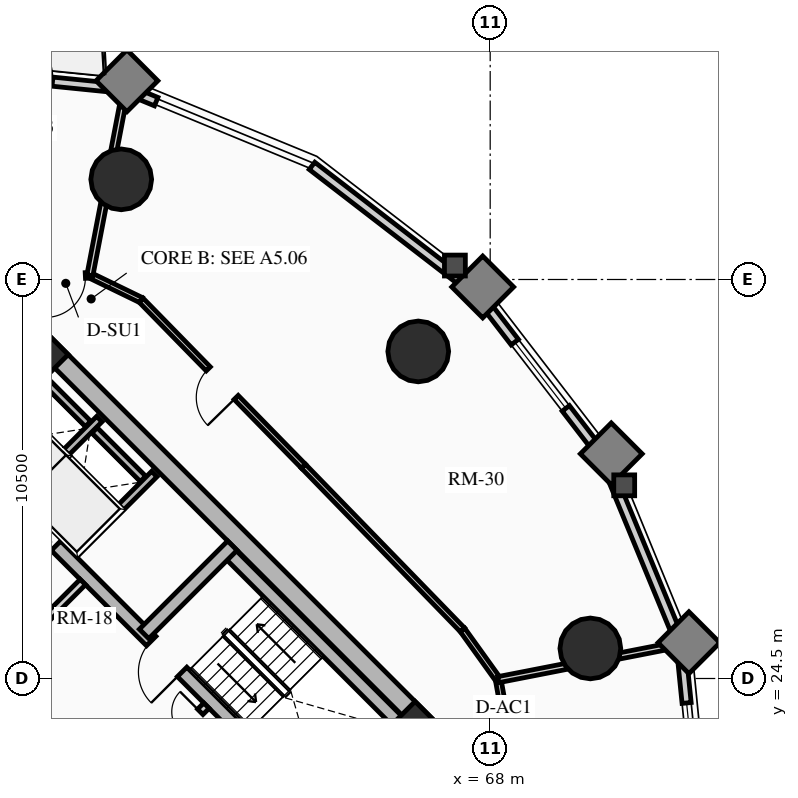
"""IFC4 building model, lengths in metres.
Left out: names, types, materials, properties, quantities, classifications, styles, units other than length and angle.
Written with IfcOpenShell. Run it as: python <this file> out.ifc"""

import sys

from ifc_helpers import new_model, si_unit, direction, frame, frame_2d, origin, origin_2d, place, context, subcontext, project, spatial, rectangle, circle, extrude, source, transform, mapped, element, fill, save


model = new_model("IFC4")
c1 = context("Model", 3, precision=1e-05, world=origin(), true_north=direction((0.0, 1.0)))
c2 = subcontext(c1, "Body", "Model", "MODEL_VIEW")
j1 = project(units=[si_unit("LENGTHUNIT", "METRE"), si_unit("PLANEANGLEUNIT", "RADIAN")], contexts=[c1])
p1 = place(None, origin())
s1 = spatial("IfcSite", under=j1, at=p1, CompositionType="ELEMENT")
p2 = place(p1, origin())
s2 = spatial("IfcBuilding", under=s1, at=p2, CompositionType="ELEMENT")
p3 = place(p2, frame((0.0, 0.0, 22.0)))
s3 = spatial("IfcBuildingStorey", under=s2, at=p3, CompositionType="ELEMENT", Elevation=22.0)
for number, where, z_axis, x_axis in (
    (1, (58.773, 15.661, 0.0), (0.0, 0.0, 1.0), (-0.707, 0.707, 0.0)),
    (2, (66.339, 23.227, 0.0), (0.0, 0.0, 1.0), (-0.707, 0.707, 0.0)),
):
    element("IfcWall", number, at=place(p3, frame(where, z_axis=z_axis, x_axis=x_axis)), inside=s3, PredefinedType="SHEAR", context=c2, shape_type="SweptSolid", body=[
        extrude(rectangle(XDim=14.3, YDim=0.5, at=frame_2d((7.15, 0.0))), origin(), (0.0, 0.0, 1.0), 2.91),
    ])
p4 = place(p3, frame((58.596, 15.838, 0.0), z_axis=(0.0, 0.0, 1.0), x_axis=(0.707106781187, 0.707106781187, 0.0)))
e3 = element("IfcWall", 3, at=p4, inside=s3, PredefinedType="SHEAR", context=c2, shape_type="SweptSolid", body=[
    extrude(rectangle(XDim=10.7, YDim=0.5, at=frame_2d((5.35, 0.0))), origin(), (0.0, 0.0, 1.0), 2.91),
])
m1 = source(origin(), c2, "Body", "SweptSolid", [
    extrude(rectangle(XDim=1.5, YDim=2.02, at=frame_2d((0.75, 1.01))), frame((0.0, 0.26, 0.0), z_axis=(0.0, -1.0, 0.0), x_axis=(1.0, 0.0, 0.0)), (0.0, 0.0, 1.0), 0.52),
])
p5 = place(p4, frame((5.45, 0.0, 0.0)))
e4 = element("IfcOpeningElement", 4, at=p5, cuts=e3, PredefinedType="OPENING", context=c2, shape_type="MappedRepresentation", body=[
    mapped(m1, transform((0.0, 0.0, 0.0), x_axis=(1.0, 0.0, 0.0), y_axis=(0.0, 1.0, 0.0), z_axis=(0.0, 0.0, 1.0), scale=1.0)),
])
p6 = place(p3, frame((48.838, 25.596, 0.0), z_axis=(0.0, 0.0, 1.0), x_axis=(0.707106781187, 0.707106781187, 0.0)))
e5 = element("IfcWall", 5, at=p6, inside=s3, PredefinedType="SHEAR", context=c2, shape_type="SweptSolid", body=[
    extrude(rectangle(XDim=10.7, YDim=0.5, at=frame_2d((5.35, 0.0))), origin(), (0.0, 0.0, 1.0), 2.91),
])
p7 = place(p6, frame((4.6, 0.0, 0.0)))
e6 = element("IfcOpeningElement", 6, at=p7, cuts=e5, PredefinedType="OPENING", context=c2, shape_type="MappedRepresentation", body=[
    mapped(m1, transform((0.0, 0.0, 0.0), x_axis=(1.0, 0.0, 0.0), y_axis=(0.0, 1.0, 0.0), z_axis=(0.0, 0.0, 1.0), scale=1.0)),
])
p8 = place(p3, frame((61.096, 18.338, 0.0), z_axis=(0.0, 0.0, 1.0), x_axis=(-0.707106781187, 0.707106781187, 0.0)))
e7 = element("IfcWall", 7, at=p8, inside=s3, PredefinedType="SHEAR", context=c2, shape_type="SweptSolid", body=[
    extrude(rectangle(XDim=13.8, YDim=0.35, at=frame_2d((6.9, 0.0))), origin(), (0.0, 0.0, 1.0), 2.91),
])
m2 = source(origin(), c2, "Body", "SweptSolid", [
    extrude(rectangle(XDim=1.1, YDim=2.015, at=frame_2d((0.55, 1.007))), frame((0.0, 0.185, 0.0), z_axis=(0.0, -1.0, 0.0), x_axis=(1.0, 0.0, 0.0)), (0.0, 0.0, 1.0), 0.37),
])
p9 = place(p8, frame((4.9, 0.0, 0.0)))
e8 = element("IfcOpeningElement", 8, at=p9, cuts=e7, PredefinedType="OPENING", context=c2, shape_type="MappedRepresentation", body=[
    mapped(m2, transform((0.0, 0.0, 0.0), x_axis=(1.0, 0.0, 0.0), y_axis=(0.0, 1.0, 0.0), z_axis=(0.0, 0.0, 1.0), scale=1.0)),
])
m3 = source(origin(), c2, "Body", "SweptSolid", [
    extrude(rectangle(XDim=1.15, YDim=2.02, at=frame_2d((0.575, 1.01))), frame((0.0, 0.185, 0.0), z_axis=(0.0, -1.0, 0.0), x_axis=(1.0, 0.0, 0.0)), (0.0, 0.0, 1.0), 0.37),
])
p10 = place(p8, frame((7.32, 0.0, 0.0)))
e9 = element("IfcOpeningElement", 9, at=p10, cuts=e7, PredefinedType="OPENING", context=c2, shape_type="MappedRepresentation", body=[
    mapped(m3, transform((0.0, 0.0, 0.0), x_axis=(1.0, 0.0, 0.0), y_axis=(0.0, 1.0, 0.0), z_axis=(0.0, 0.0, 1.0), scale=1.0)),
])
p11 = place(p3, frame((63.662, 20.904, 0.0), z_axis=(0.0, 0.0, 1.0), x_axis=(-0.707106781187, 0.707106781187, 0.0)))
e10 = element("IfcWall", 10, at=p11, inside=s3, PredefinedType="SHEAR", context=c2, shape_type="SweptSolid", body=[
    extrude(rectangle(XDim=13.8, YDim=0.35, at=frame_2d((6.9, 0.0))), origin(), (0.0, 0.0, 1.0), 2.91),
])
p12 = place(p11, frame((10.025, 0.0, 0.0)))
e11 = element("IfcOpeningElement", 11, at=p12, cuts=e10, PredefinedType="OPENING", context=c2, shape_type="MappedRepresentation", body=[
    mapped(m2, transform((0.0, 0.0, 0.0), x_axis=(1.0, 0.0, 0.0), y_axis=(0.0, 1.0, 0.0), z_axis=(0.0, 0.0, 1.0), scale=1.0)),
])
p13 = place(p11, frame((12.025, 0.0, 0.0)))
e12 = element("IfcOpeningElement", 12, at=p13, cuts=e10, PredefinedType="OPENING", context=c2, shape_type="MappedRepresentation", body=[
    mapped(m2, transform((0.0, 0.0, 0.0), x_axis=(1.0, 0.0, 0.0), y_axis=(0.0, 1.0, 0.0), z_axis=(0.0, 0.0, 1.0), scale=1.0)),
])
p14 = place(p11, frame((5.33, 0.0, 0.0)))
e13 = element("IfcOpeningElement", 13, at=p14, cuts=e10, PredefinedType="OPENING", context=c2, shape_type="MappedRepresentation", body=[
    mapped(m3, transform((0.0, 0.0, 0.0), x_axis=(1.0, 0.0, 0.0), y_axis=(0.0, 1.0, 0.0), z_axis=(0.0, 0.0, 1.0), scale=1.0)),
])
p15 = place(p3, frame((65.847, 23.089, 0.0), z_axis=(0.0, 0.0, 1.0), x_axis=(-0.707106781187, 0.707106781187, 0.0)))
e14 = element("IfcWall", 14, at=p15, inside=s3, PredefinedType="SHEAR", context=c2, shape_type="SweptSolid", body=[
    extrude(rectangle(XDim=6.745, YDim=0.35, at=frame_2d((3.373, 0.0))), origin(), (0.0, 0.0, 1.0), 2.91),
])
p16 = place(p3, frame((58.893, 25.674, 0.0), z_axis=(0.0, 0.0, 1.0), x_axis=(0.707106781187, 0.707106781187, 0.0)))
e15 = element("IfcWall", 15, at=p16, inside=s3, PredefinedType="SHEAR", context=c2, shape_type="SweptSolid", body=[
    extrude(rectangle(XDim=3.285, YDim=0.35, at=frame_2d((1.643, 0.0))), origin(), (0.0, 0.0, 1.0), 2.91),
])
for number, where, z_axis, x_axis in (
    (16, (66.024, 23.294, 0.0), (0.0, 0.0, 1.0), (0.707, 0.707, 0.0)),
    (17, (56.294, 33.024, 0.0), (0.0, 0.0, 1.0), (0.707, 0.707, 0.0)),
):
    element("IfcColumn", number, at=place(p3, frame(where, z_axis=z_axis, x_axis=x_axis)), inside=s3, PredefinedType="COLUMN", context=c2, shape_type="SweptSolid", body=[
        extrude(rectangle(XDim=0.85, YDim=0.85, at=origin_2d()), origin(), (0.0, 0.0, 1.0), 2.91),
    ])
for number, where, z_axis, x_axis in (
    (18, (66.107, 33.107, 0.0), (0.0, 0.0, 1.0), (1.0, 0.0, 0.0)),
    (19, (58.291, 37.635, 0.0), (0.0, 0.0, 1.0), (1.0, 0.0, 0.0)),
    (20, (70.635, 25.291, 0.0), (0.0, 0.0, 1.0), (1.0, 0.0, 0.0)),
):
    element("IfcColumn", number, at=place(p3, frame(where, z_axis=z_axis, x_axis=x_axis)), inside=s3, PredefinedType="USERDEFINED", context=c2, shape_type="SweptSolid", body=[
        extrude(circle(Radius=0.8, at=origin_2d()), origin(), (0.0, 0.0, 1.0), 2.91),
    ])
p17 = place(p3, frame((63.312, 37.99, 0.0), z_axis=(0.0, 0.0, 1.0), x_axis=(0.791972010801, -0.610557396243, 0.0)))
e21 = element("IfcWall", 21, at=p17, inside=s3, PredefinedType="SOLIDWALL", context=c2, shape_type="SweptSolid", body=[
    extrude(rectangle(XDim=5.475, YDim=0.24, at=frame_2d((2.737, 0.0))), origin(), (0.0, 0.0, 1.0), 2.073),
])
p18 = place(p3, frame((58.407, 40.012, 0.0), z_axis=(0.0, 0.0, 1.0), x_axis=(0.924556017656, -0.381046152345, 0.0)))
e22 = element("IfcWall", 22, at=p18, inside=s3, PredefinedType="SOLIDWALL", context=c2, shape_type="SweptSolid", body=[
    extrude(rectangle(XDim=0.87, YDim=0.24, at=frame_2d((0.435, 0.0))), origin(), (0.0, 0.0, 1.0), 2.073),
])
p19 = place(p3, frame((53.414, 40.516, 0.0), z_axis=(0.0, 0.0, 1.0), x_axis=(0.994951574538, -0.100356187272, 0.0)))
e23 = element("IfcWall", 23, at=p19, inside=s3, PredefinedType="SOLIDWALL", context=c2, shape_type="SweptSolid", body=[
    extrude(rectangle(XDim=5.019, YDim=0.24, at=frame_2d((2.509, 0.0))), origin(), (0.0, 0.0, 1.0), 2.073),
])
m4 = source(origin(), c2, "Body", "SweptSolid", [
    extrude(rectangle(XDim=1.15, YDim=2.005, at=frame_2d((0.575, 1.002))), frame((0.0, 0.13, 0.0), z_axis=(0.0, -1.0, 0.0), x_axis=(1.0, 0.0, 0.0)), (0.0, 0.0, 1.0), 0.26),
])
p20 = place(p19, frame((1.934, 0.0, 0.0)))
e24 = element("IfcOpeningElement", 24, at=p20, cuts=e23, PredefinedType="OPENING", context=c2, shape_type="MappedRepresentation", body=[
    mapped(m4, transform((0.0, 0.0, 0.0), x_axis=(1.0, 0.0, 0.0), y_axis=(0.0, 1.0, 0.0), z_axis=(0.0, 0.0, 1.0), scale=1.0)),
])
p21 = place(p3, frame((73.012, 25.407, 0.0), z_axis=(0.0, 0.0, 1.0), x_axis=(0.100356187272, -0.994951574538, 0.0)))
e25 = element("IfcWall", 25, at=p21, inside=s3, PredefinedType="SOLIDWALL", context=c2, shape_type="SweptSolid", body=[
    extrude(rectangle(XDim=5.019, YDim=0.24, at=frame_2d((2.509, 0.0))), origin(), (0.0, 0.0, 1.0), 2.073),
])
m5 = source(origin(), c2, "Body", "SweptSolid", [
    extrude(rectangle(XDim=1.9, YDim=1.35, at=frame_2d((0.95, 0.675))), frame((0.0, 0.13, 0.0), z_axis=(0.0, -1.0, 0.0), x_axis=(1.0, 0.0, 0.0)), (0.0, 0.0, 1.0), 0.26),
])
p22 = place(p21, frame((1.559, 0.0, 0.65)))
e26 = element("IfcOpeningElement", 26, at=p22, cuts=e25, PredefinedType="OPENING", context=c2, shape_type="MappedRepresentation", body=[
    mapped(m5, transform((0.0, 0.0, 0.0), x_axis=(1.0, 0.0, 0.0), y_axis=(0.0, 1.0, 0.0), z_axis=(0.0, 0.0, 1.0), scale=1.0)),
])
p23 = place(p3, frame((70.99, 30.312, 0.0), z_axis=(0.0, 0.0, 1.0), x_axis=(0.381113147118, -0.924528403616, 0.0)))
e27 = element("IfcWall", 27, at=p23, inside=s3, PredefinedType="SOLIDWALL", context=c2, shape_type="SweptSolid", body=[
    extrude(rectangle(XDim=5.305, YDim=0.24, at=frame_2d((2.653, 0.0))), origin(), (0.0, 0.0, 1.0), 2.073),
])
p24 = place(p3, frame((67.648, 34.648, 0.0), z_axis=(0.0, 0.0, 1.0), x_axis=(0.610557396243, -0.791972010801, 0.0)))
e28 = element("IfcWall", 28, at=p24, inside=s3, PredefinedType="SOLIDWALL", context=c2, shape_type="SweptSolid", body=[
    extrude(rectangle(XDim=5.475, YDim=0.24, at=frame_2d((2.737, 0.0))), origin(), (0.0, 0.0, 1.0), 2.073),
])
m6 = source(origin(), c2, "Body", "SweptSolid", [
    extrude(rectangle(XDim=2.2, YDim=1.35, at=frame_2d((1.1, 0.675))), frame((0.0, 0.13, 0.0), z_axis=(0.0, -1.0, 0.0), x_axis=(1.0, 0.0, 0.0)), (0.0, 0.0, 1.0), 0.26),
])
p25 = place(p24, frame((1.637, 0.0, 0.65)))
e29 = element("IfcOpeningElement", 29, at=p25, cuts=e28, PredefinedType="OPENING", context=c2, shape_type="MappedRepresentation", body=[
    mapped(m6, transform((0.0, 0.0, 0.0), x_axis=(1.0, 0.0, 0.0), y_axis=(0.0, 1.0, 0.0), z_axis=(0.0, 0.0, 1.0), scale=1.0)),
])
p26 = place(p3, frame((57.062, 27.781, 0.0), z_axis=(0.0, 0.0, 1.0), x_axis=(0.707106781187, 0.707106781187, 0.0)))
e30 = element("IfcWall", 30, at=p26, inside=s3, PredefinedType="SHEAR", context=c2, shape_type="SweptSolid", body=[
    extrude(rectangle(XDim=2.97, YDim=0.2, at=frame_2d((1.485, 0.0))), origin(), (0.0, 0.0, 1.0), 2.91),
])
p27 = place(p3, frame((55.615, 29.227, 0.0), z_axis=(0.0, 0.0, 1.0), x_axis=(0.707147878904, 0.70706568108, 0.0)))
e31 = element("IfcWall", 31, at=p27, inside=s3, PredefinedType="SHEAR", context=c2, shape_type="SweptSolid", body=[
    extrude(rectangle(XDim=2.97, YDim=0.2, at=frame_2d((1.485, 0.0))), origin(), (0.0, 0.0, 1.0), 2.91),
])
p28 = place(p3, frame((58.865, 29.754, 0.0), z_axis=(0.0, 0.0, 1.0), x_axis=(-0.707174411312, 0.707039144592, 0.0)))
e32 = element("IfcWall", 32, at=p28, inside=s3, PredefinedType="SHEAR", context=c2, shape_type="SweptSolid", body=[
    extrude(rectangle(XDim=1.805, YDim=0.2, at=frame_2d((0.902, 0.0))), origin(), (0.0, 0.0, 1.0), 2.91),
])
p29 = place(p3, frame((57.419, 31.2, 0.0), z_axis=(0.0, 0.0, 1.0), x_axis=(-0.707032117043, 0.707181437447, 0.0)))
e33 = element("IfcWall", 33, at=p29, inside=s3, PredefinedType="SHEAR", context=c2, shape_type="SweptSolid", body=[
    extrude(rectangle(XDim=1.635, YDim=0.2, at=frame_2d((0.817, 0.0))), origin(), (0.0, 0.0, 1.0), 2.91),
])
p30 = place(p3, frame((58.214, 21.467, 0.0), z_axis=(0.0, 0.0, 1.0), x_axis=(0.707106781187, 0.707106781187, 0.0)))
e34 = element("IfcWall", 34, at=p30, inside=s3, PredefinedType="PARTITIONING", context=c2, shape_type="SweptSolid", body=[
    extrude(rectangle(XDim=3.28, YDim=0.2, at=frame_2d((1.64, 0.0))), origin(), (0.0, 0.0, 1.0), 2.635),
])
m7 = source(origin(), c2, "Body", "SweptSolid", [
    extrude(rectangle(XDim=1.5, YDim=2.02, at=frame_2d((0.75, 1.01))), frame((0.0, 0.11, 0.0), z_axis=(0.0, -1.0, 0.0), x_axis=(1.0, 0.0, 0.0)), (0.0, 0.0, 1.0), 0.22),
])
p31 = place(p30, frame((1.55, 0.0, 0.0)))
e35 = element("IfcOpeningElement", 35, at=p31, cuts=e34, PredefinedType="OPENING", context=c2, shape_type="MappedRepresentation", body=[
    mapped(m7, transform((0.0, 0.0, 0.0), x_axis=(1.0, 0.0, 0.0), y_axis=(0.0, 1.0, 0.0), z_axis=(0.0, 0.0, 1.0), scale=1.0)),
])
p32 = place(p3, frame((54.961, 24.719, 0.0), z_axis=(0.0, 0.0, 1.0), x_axis=(0.707106781187, 0.707106781187, 0.0)))
e36 = element("IfcWall", 36, at=p32, inside=s3, PredefinedType="PARTITIONING", context=c2, shape_type="SweptSolid", body=[
    extrude(rectangle(XDim=3.28, YDim=0.2, at=frame_2d((1.64, 0.0))), origin(), (0.0, 0.0, 1.0), 2.635),
])
m8 = source(origin(), c2, "Body", "SweptSolid", [
    extrude(rectangle(XDim=0.9, YDim=2.005, at=frame_2d((0.45, 1.002))), frame((0.0, 0.11, 0.0), z_axis=(0.0, -1.0, 0.0), x_axis=(1.0, 0.0, 0.0)), (0.0, 0.0, 1.0), 0.22),
])
p33 = place(p32, frame((0.16, 0.0, 0.0)))
e37 = element("IfcOpeningElement", 37, at=p33, cuts=e36, PredefinedType="OPENING", context=c2, shape_type="MappedRepresentation", body=[
    mapped(m8, transform((0.0, 0.0, 0.0), x_axis=(1.0, 0.0, 0.0), y_axis=(0.0, 1.0, 0.0), z_axis=(0.0, 0.0, 1.0), scale=1.0)),
])
p34 = place(p3, frame((63.086, 30.086, 0.0), z_axis=(0.0, 0.0, 1.0), x_axis=(-0.699075897379, 0.715047473741, 0.0)))
e38 = element("IfcWall", 38, at=p34, inside=s3, PredefinedType="PARTITIONING", context=c2, shape_type="SweptSolid", body=[
    extrude(rectangle(XDim=6.114, YDim=0.15, at=frame_2d((3.057, 0.0))), origin(), (0.0, 0.0, 1.0), 2.159),
])
m9 = source(origin(), c2, "Body", "SweptSolid", [
    extrude(rectangle(XDim=1.05, YDim=2.015, at=frame_2d((0.525, 1.007))), frame((0.0, 0.085, 0.0), z_axis=(0.0, -1.0, 0.0), x_axis=(1.0, 0.0, 0.0)), (0.0, 0.0, 1.0), 0.17),
])
p35 = place(p34, frame((2.532, 0.0, 0.0)))
e39 = element("IfcOpeningElement", 39, at=p35, cuts=e38, PredefinedType="OPENING", context=c2, shape_type="MappedRepresentation", body=[
    mapped(m9, transform((0.0, 0.0, 0.0), x_axis=(1.0, 0.0, 0.0), y_axis=(0.0, 1.0, 0.0), z_axis=(0.0, 0.0, 1.0), scale=1.0)),
])
p36 = place(p3, frame((58.812, 34.458, 0.0), z_axis=(0.0, 0.0, 1.0), x_axis=(-0.899559490277, 0.436798264021, 0.0)))
e40 = element("IfcWall", 40, at=p36, inside=s3, PredefinedType="PARTITIONING", context=c2, shape_type="SweptSolid", body=[
    extrude(rectangle(XDim=1.495, YDim=0.15, at=frame_2d((0.748, 0.0))), origin(), (0.0, 0.0, 1.0), 2.205),
])
p37 = place(p3, frame((57.467, 35.111, 0.0), z_axis=(0.0, 0.0, 1.0), x_axis=(-0.998691757323, -0.051134859488, 0.0)))
e41 = element("IfcWall", 41, at=p37, inside=s3, PredefinedType="PARTITIONING", context=c2, shape_type="SweptSolid", body=[
    extrude(rectangle(XDim=1.485, YDim=0.15, at=frame_2d((0.742, 0.0))), origin(), (0.0, 0.0, 1.0), 2.159),
])
p38 = place(p37, frame((0.12, 0.0, 0.0)))
e42 = element("IfcOpeningElement", 42, at=p38, cuts=e41, PredefinedType="OPENING", context=c2, shape_type="MappedRepresentation", body=[
    mapped(m9, transform((0.0, 0.0, 0.0), x_axis=(1.0, 0.0, 0.0), y_axis=(0.0, 1.0, 0.0), z_axis=(0.0, 0.0, 1.0), scale=1.0)),
])
p39 = place(p3, frame((68.456, 23.11, 0.0), z_axis=(0.0, 0.0, 1.0), x_axis=(-0.1772522795, 0.984165448191, 0.0)))
e43 = element("IfcWall", 43, at=p39, inside=s3, PredefinedType="PARTITIONING", context=c2, shape_type="SweptSolid", body=[
    extrude(rectangle(XDim=1.382, YDim=0.15, at=frame_2d((0.691, 0.0))), origin(), (0.0, 0.0, 1.0), 2.159),
])
p40 = place(p3, frame((68.211, 24.469, 0.0), z_axis=(0.0, 0.0, 1.0), x_axis=(-0.583012141368, 0.812463441034, 0.0)))
e44 = element("IfcWall", 44, at=p40, inside=s3, PredefinedType="PARTITIONING", context=c2, shape_type="SweptSolid", body=[
    extrude(rectangle(XDim=1.613, YDim=0.15, at=frame_2d((0.807, 0.0))), origin(), (0.0, 0.0, 1.0), 2.205),
])
p41 = place(p3, frame((67.27, 25.78, 0.0), z_axis=(0.0, 0.0, 1.0), x_axis=(-0.696847842907, 0.717218992942, 0.0)))
e45 = element("IfcWall", 45, at=p41, inside=s3, PredefinedType="PARTITIONING", context=c2, shape_type="SweptSolid", body=[
    extrude(rectangle(XDim=6.004, YDim=0.15, at=frame_2d((3.002, 0.0))), origin(), (0.0, 0.0, 1.0), 2.635),
])
p42 = place(p3, frame((57.467, 35.111, 0.0), z_axis=(0.0, 0.0, 1.0), x_axis=(0.188572285328, 0.982059312468, 0.0)))
e46 = element("IfcWall", 46, at=p42, inside=s3, PredefinedType="PARTITIONING", context=c2, shape_type="SweptSolid", body=[
    extrude(rectangle(XDim=4.97, YDim=0.16, at=frame_2d((2.485, 0.0))), origin(), (0.0, 0.0, 1.0), 2.073),
])
p43 = place(p3, frame((68.211, 24.469, 0.0), z_axis=(0.0, 0.0, 1.0), x_axis=(0.981421381452, 0.19186472325, 0.0)))
e47 = element("IfcWall", 47, at=p43, inside=s3, PredefinedType="PARTITIONING", context=c2, shape_type="SweptSolid", body=[
    extrude(rectangle(XDim=4.872, YDim=0.16, at=frame_2d((2.436, 0.0))), origin(), (0.0, 0.0, 1.0), 2.073),
])
m10 = source(origin(), c2, "Body", "SweptSolid", [
    extrude(rectangle(XDim=1.15, YDim=2.005, at=frame_2d((0.575, 1.002))), frame((0.0, 0.025, 0.0), z_axis=(0.0, -1.0, 0.0), x_axis=(1.0, 0.0, 0.0)), (0.0, 0.0, 1.0), 0.05),
])
p44 = place(p20, origin())
e48 = element("IfcDoor", 48, at=p44, inside=s3, OperationType="SINGLE_SWING_LEFT", PredefinedType="DOOR", context=c2, shape_type="MappedRepresentation", body=[
    mapped(m10, transform((0.0, 0.0, 0.0), x_axis=(1.0, 0.0, 0.0), y_axis=(0.0, 1.0, 0.0), z_axis=(0.0, 0.0, 1.0), scale=1.0)),
])
fill(e24, e48)
m11 = source(origin(), c2, "Body", "SweptSolid", [
    extrude(rectangle(XDim=1.9, YDim=1.35, at=frame_2d((0.95, 0.675))), frame((0.0, 0.03, 0.0), z_axis=(0.0, -1.0, 0.0), x_axis=(1.0, 0.0, 0.0)), (0.0, 0.0, 1.0), 0.06),
])
p45 = place(p22, origin())
e49 = element("IfcWindow", 49, at=p45, inside=s3, PartitioningType="DOUBLE_PANEL_VERTICAL", PredefinedType="WINDOW", context=c2, shape_type="MappedRepresentation", body=[
    mapped(m11, transform((0.0, 0.0, 0.0), x_axis=(1.0, 0.0, 0.0), y_axis=(0.0, 1.0, 0.0), z_axis=(0.0, 0.0, 1.0), scale=1.0)),
])
fill(e26, e49)
m12 = source(origin(), c2, "Body", "SweptSolid", [
    extrude(rectangle(XDim=2.2, YDim=1.35, at=frame_2d((1.1, 0.675))), frame((0.0, 0.03, 0.0), z_axis=(0.0, -1.0, 0.0), x_axis=(1.0, 0.0, 0.0)), (0.0, 0.0, 1.0), 0.06),
])
p46 = place(p25, origin())
e50 = element("IfcWindow", 50, at=p46, inside=s3, PartitioningType="DOUBLE_PANEL_VERTICAL", PredefinedType="WINDOW", context=c2, shape_type="MappedRepresentation", body=[
    mapped(m12, transform((0.0, 0.0, 0.0), x_axis=(1.0, 0.0, 0.0), y_axis=(0.0, 1.0, 0.0), z_axis=(0.0, 0.0, 1.0), scale=1.0)),
])
fill(e29, e50)
m13 = source(origin(), c2, "Body", "SweptSolid", [
    extrude(rectangle(XDim=1.1, YDim=2.015, at=frame_2d((0.55, 1.007))), frame((0.0, 0.025, 0.0), z_axis=(0.0, -1.0, 0.0), x_axis=(1.0, 0.0, 0.0)), (0.0, 0.0, 1.0), 0.05),
])
p47 = place(p12, origin())
e51 = element("IfcDoor", 51, at=p47, inside=s3, OperationType="SLIDING_TO_RIGHT", PredefinedType="DOOR", context=c2, shape_type="MappedRepresentation", body=[
    mapped(m13, transform((0.0, 0.0, 0.0), x_axis=(1.0, 0.0, 0.0), y_axis=(0.0, 1.0, 0.0), z_axis=(0.0, 0.0, 1.0), scale=1.0)),
])
fill(e11, e51)
m14 = source(origin(), c2, "Body", "SweptSolid", [
    extrude(rectangle(XDim=1.15, YDim=2.02, at=frame_2d((0.575, 1.01))), frame((0.0, 0.025, 0.0), z_axis=(0.0, -1.0, 0.0), x_axis=(1.0, 0.0, 0.0)), (0.0, 0.0, 1.0), 0.05),
])
p48 = place(p14, origin())
e52 = element("IfcDoor", 52, at=p48, inside=s3, OperationType="SINGLE_SWING_LEFT", PredefinedType="DOOR", context=c2, shape_type="MappedRepresentation", body=[
    mapped(m14, transform((0.0, 0.0, 0.0), x_axis=(1.0, 0.0, 0.0), y_axis=(0.0, 1.0, 0.0), z_axis=(0.0, 0.0, 1.0), scale=1.0)),
])
fill(e13, e52)
m15 = source(origin(), c2, "Body", "SweptSolid", [
    extrude(rectangle(XDim=1.5, YDim=2.02, at=frame_2d((0.75, 1.01))), frame((0.0, 0.025, 0.0), z_axis=(0.0, -1.0, 0.0), x_axis=(1.0, 0.0, 0.0)), (0.0, 0.0, 1.0), 0.05),
])
p49 = place(p31, origin())
e53 = element("IfcDoor", 53, at=p49, inside=s3, OperationType="DOUBLE_DOOR_SINGLE_SWING", PredefinedType="DOOR", context=c2, shape_type="MappedRepresentation", body=[
    mapped(m15, transform((0.0, 0.0, 0.0), x_axis=(1.0, 0.0, 0.0), y_axis=(0.0, 1.0, 0.0), z_axis=(0.0, 0.0, 1.0), scale=1.0)),
])
fill(e35, e53)
m16 = source(origin(), c2, "Body", "SweptSolid", [
    extrude(rectangle(XDim=1.05, YDim=2.015, at=frame_2d((0.525, 1.007))), frame((0.0, 0.025, 0.0), z_axis=(0.0, -1.0, 0.0), x_axis=(1.0, 0.0, 0.0)), (0.0, 0.0, 1.0), 0.05),
])
p50 = place(p38, origin())
e54 = element("IfcDoor", 54, at=p50, inside=s3, OperationType="SINGLE_SWING_RIGHT", PredefinedType="DOOR", context=c2, shape_type="MappedRepresentation", body=[
    mapped(m16, transform((0.0, 0.0, 0.0), x_axis=(1.0, 0.0, 0.0), y_axis=(0.0, 1.0, 0.0), z_axis=(0.0, 0.0, 1.0), scale=1.0)),
])
fill(e42, e54)
p51 = place(p35, origin())
e55 = element("IfcDoor", 55, at=p51, inside=s3, OperationType="SINGLE_SWING_LEFT", PredefinedType="DOOR", context=c2, shape_type="MappedRepresentation", body=[
    mapped(m16, transform((0.0, 0.0, 0.0), x_axis=(1.0, 0.0, 0.0), y_axis=(0.0, 1.0, 0.0), z_axis=(0.0, 0.0, 1.0), scale=1.0)),
])
fill(e39, e55)
save(model, sys.argv[1])
